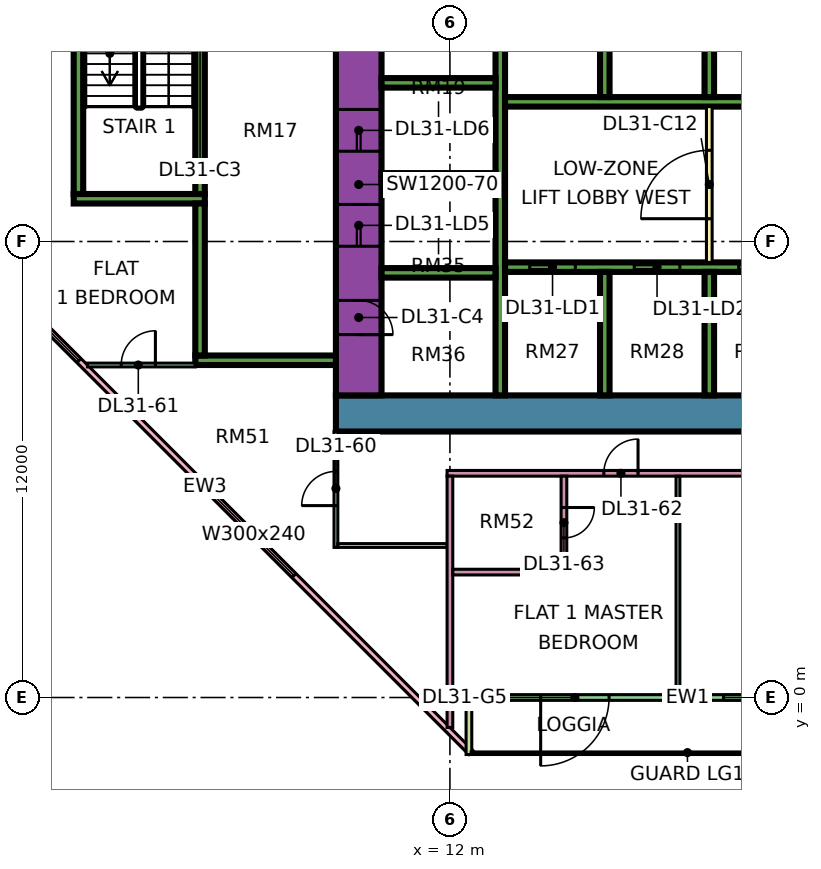
"""IFC4 building model, lengths in metres.
Left out: names, types, materials, properties, quantities, classifications, styles, units other than length and angle.
Written with IfcOpenShell. Run it as: python <this file> out.ifc"""

import sys

from ifc_helpers import new_model, si_unit, direction, frame, frame_2d, origin, place, context, subcontext, project, spatial, rectangle, extrude, element, fill, save


model = new_model("IFC4")
c1 = context("Model", 3, precision=1e-05, world=origin(), true_north=direction((0.0, 1.0)))
c2 = subcontext(c1, "Body", "Model", "MODEL_VIEW")
j1 = project(units=[si_unit("LENGTHUNIT", "METRE"), si_unit("PLANEANGLEUNIT", "RADIAN")], contexts=[c1])
p1 = place(None, origin())
s1 = spatial("IfcSite", under=j1, at=p1, CompositionType="ELEMENT")
p2 = place(p1, origin())
s2 = spatial("IfcBuilding", under=s1, at=p2, CompositionType="ELEMENT")
p3 = place(p2, frame((0.0, 0.0, 133.15)))
s3 = spatial("IfcBuildingStorey", under=s2, at=p3, CompositionType="ELEMENT", Elevation=133.15)
p4 = place(p3, frame((9.0, 7.475, 0.0), z_axis=(0.0, 0.0, 1.0), x_axis=(1.0, 0.0, 0.0)))
e1 = element("IfcWall", 1, at=p4, inside=s3, PredefinedType="SHEAR", context=c2, shape_type="SweptSolid", body=[
    extrude(rectangle(XDim=25.0, YDim=0.95, at=frame_2d((12.5, 0.0))), origin(), (0.0, 0.0, 1.0), 3.75),
])
p5 = place(p3, frame((9.6, 7.95, 0.0), z_axis=(0.0, 0.0, 1.0), x_axis=(0.0, 1.0, 0.0)))
e2 = element("IfcWall", 2, at=p5, inside=s3, PredefinedType="SHEAR", context=c2, shape_type="SweptSolid", body=[
    extrude(rectangle(XDim=11.1, YDim=1.2, at=frame_2d((5.55, 0.0))), origin(), (0.0, 0.0, 1.0), 3.75),
])
p6 = place(p5, frame((3.925, 0.0, 0.0)))
e3 = element("IfcOpeningElement", 3, at=p6, cuts=e2, PredefinedType="OPENING", context=c2, shape_type="SweptSolid", body=[
    extrude(rectangle(XDim=1.1, YDim=2.2, at=frame_2d((0.55, 1.1))), frame((0.0, 0.61, 0.0), z_axis=(0.0, -1.0, 0.0), x_axis=(1.0, 0.0, 0.0)), (0.0, 0.0, 1.0), 1.22),
])
p7 = place(p5, frame((6.425, 0.0, 0.0)))
e4 = element("IfcOpeningElement", 4, at=p7, cuts=e2, PredefinedType="OPENING", context=c2, shape_type="SweptSolid", body=[
    extrude(rectangle(XDim=1.1, YDim=2.2, at=frame_2d((0.55, 1.1))), frame((0.0, 0.61, 0.0), z_axis=(0.0, -1.0, 0.0), x_axis=(1.0, 0.0, 0.0)), (0.0, 0.0, 1.0), 1.22),
])
p8 = place(p5, frame((9.175, 0.0, 0.0)))
e5 = element("IfcOpeningElement", 5, at=p8, cuts=e2, PredefinedType="OPENING", context=c2, shape_type="SweptSolid", body=[
    extrude(rectangle(XDim=1.1, YDim=2.2, at=frame_2d((0.55, 1.1))), frame((0.0, 0.61, 0.0), z_axis=(0.0, -1.0, 0.0), x_axis=(1.0, 0.0, 0.0)), (0.0, 0.0, 1.0), 1.22),
])
p9 = place(p5, frame((1.6, 0.0, 0.0)))
e6 = element("IfcOpeningElement", 6, at=p9, cuts=e2, PredefinedType="OPENING", context=c2, shape_type="SweptSolid", body=[
    extrude(rectangle(XDim=0.9, YDim=2.1, at=frame_2d((0.45, 1.05))), frame((0.0, 0.61, 0.0), z_axis=(0.0, -1.0, 0.0), x_axis=(1.0, 0.0, 0.0)), (0.0, 0.0, 1.0), 1.22),
])
p10 = place(p3, frame((13.325, 7.95, 0.0), z_axis=(0.0, 0.0, 1.0), x_axis=(0.0, 1.0, 0.0)))
e7 = element("IfcWall", 7, at=p10, inside=s3, PredefinedType="SHEAR", context=c2, shape_type="SweptSolid", body=[
    extrude(rectangle(XDim=11.1, YDim=0.25, at=frame_2d((5.55, 0.0))), origin(), (0.0, 0.0, 1.0), 3.75),
])
p11 = place(p3, frame((13.45, 11.325, 0.0), z_axis=(0.0, 0.0, 1.0), x_axis=(1.0, 0.0, 0.0)))
e8 = element("IfcWall", 8, at=p11, inside=s3, PredefinedType="SHEAR", context=c2, shape_type="SweptSolid", body=[
    extrude(rectangle(XDim=19.6, YDim=0.25, at=frame_2d((9.8, 0.0))), origin(), (0.0, 0.0, 1.0), 3.75),
])
p12 = place(p11, frame((0.65, 0.0, 0.0)))
e9 = element("IfcOpeningElement", 9, at=p12, cuts=e8, PredefinedType="OPENING", context=c2, shape_type="SweptSolid", body=[
    extrude(rectangle(XDim=1.2, YDim=2.2, at=frame_2d((0.6, 1.1))), frame((0.0, 0.135, 0.0), z_axis=(0.0, -1.0, 0.0), x_axis=(1.0, 0.0, 0.0)), (0.0, 0.0, 1.0), 0.27),
])
p13 = place(p11, frame((3.4, 0.0, 0.0)))
e10 = element("IfcOpeningElement", 10, at=p13, cuts=e8, PredefinedType="OPENING", context=c2, shape_type="SweptSolid", body=[
    extrude(rectangle(XDim=1.2, YDim=2.2, at=frame_2d((0.6, 1.1))), frame((0.0, 0.135, 0.0), z_axis=(0.0, -1.0, 0.0), x_axis=(1.0, 0.0, 0.0)), (0.0, 0.0, 1.0), 0.27),
])
p14 = place(p11, frame((6.15, 0.0, 0.0)))
e11 = element("IfcOpeningElement", 11, at=p14, cuts=e8, PredefinedType="OPENING", context=c2, shape_type="SweptSolid", body=[
    extrude(rectangle(XDim=1.2, YDim=2.2, at=frame_2d((0.6, 1.1))), frame((0.0, 0.135, 0.0), z_axis=(0.0, -1.0, 0.0), x_axis=(1.0, 0.0, 0.0)), (0.0, 0.0, 1.0), 0.27),
])
p15 = place(p11, frame((8.9, 0.0, 0.0)))
e12 = element("IfcOpeningElement", 12, at=p15, cuts=e8, PredefinedType="OPENING", context=c2, shape_type="SweptSolid", body=[
    extrude(rectangle(XDim=1.2, YDim=2.2, at=frame_2d((0.6, 1.1))), frame((0.0, 0.135, 0.0), z_axis=(0.0, -1.0, 0.0), x_axis=(1.0, 0.0, 0.0)), (0.0, 0.0, 1.0), 0.27),
])
p16 = place(p3, frame((13.45, 15.675, 0.0), z_axis=(0.0, 0.0, 1.0), x_axis=(1.0, 0.0, 0.0)))
e13 = element("IfcWall", 13, at=p16, inside=s3, PredefinedType="SHEAR", context=c2, shape_type="SweptSolid", body=[
    extrude(rectangle(XDim=13.75, YDim=0.25, at=frame_2d((6.875, 0.0))), origin(), (0.0, 0.0, 1.0), 3.75),
])
for number, where, z_axis, x_axis in (
    (14, (10.2, 11.175, 0.0), (0.0, 0.0, 1.0), (1.0, 0.0, 0.0)),
    (15, (10.2, 13.675, 0.0), (0.0, 0.0, 1.0), (1.0, 0.0, 0.0)),
    (16, (10.2, 16.175, 0.0), (0.0, 0.0, 1.0), (1.0, 0.0, 0.0)),
):
    element("IfcWall", number, at=place(p3, frame(where, z_axis=z_axis, x_axis=x_axis)), inside=s3, PredefinedType="SHEAR", context=c2, shape_type="SweptSolid", body=[
        extrude(rectangle(XDim=3.0, YDim=0.25, at=frame_2d((1.5, 0.0))), origin(), (0.0, 0.0, 1.0), 3.75),
    ])
for number, where, z_axis, x_axis in (
    (17, (16.075, 7.95, 0.0), (0.0, 0.0, 1.0), (0.0, 1.0, 0.0)),
    (18, (18.825, 7.95, 0.0), (0.0, 0.0, 1.0), (0.0, 1.0, 0.0)),
    (19, (16.075, 15.8, 0.0), (0.0, 0.0, 1.0), (0.0, 1.0, 0.0)),
    (20, (18.825, 15.8, 0.0), (0.0, 0.0, 1.0), (0.0, 1.0, 0.0)),
):
    element("IfcWall", number, at=place(p3, frame(where, z_axis=z_axis, x_axis=x_axis)), inside=s3, PredefinedType="SHEAR", context=c2, shape_type="SweptSolid", body=[
        extrude(rectangle(XDim=3.25, YDim=0.25, at=frame_2d((1.625, 0.0))), origin(), (0.0, 0.0, 1.0), 3.75),
    ])
p17 = place(p3, frame((2.1, 13.125, 0.0), z_axis=(0.0, 0.0, 1.0), x_axis=(1.0, 0.0, 0.0)))
e21 = element("IfcWall", 21, at=p17, inside=s3, PredefinedType="SHEAR", context=c2, shape_type="SweptSolid", body=[
    extrude(rectangle(XDim=3.45, YDim=0.25, at=frame_2d((1.725, 0.0))), origin(), (0.0, 0.0, 1.0), 3.75),
])
p18 = place(p3, frame((2.225, 13.25, 0.0), z_axis=(0.0, 0.0, 1.0), x_axis=(0.0, 1.0, 0.0)))
e22 = element("IfcWall", 22, at=p18, inside=s3, PredefinedType="SHEAR", context=c2, shape_type="SweptSolid", body=[
    extrude(rectangle(XDim=6.5, YDim=0.25, at=frame_2d((3.25, 0.0))), origin(), (0.0, 0.0, 1.0), 3.75),
])
p19 = place(p3, frame((5.425, 13.25, 0.0), z_axis=(0.0, 0.0, 1.0), x_axis=(0.0, 1.0, 0.0)))
e23 = element("IfcWall", 23, at=p19, inside=s3, PredefinedType="SHEAR", context=c2, shape_type="SweptSolid", body=[
    extrude(rectangle(XDim=6.5, YDim=0.25, at=frame_2d((3.25, 0.0))), origin(), (0.0, 0.0, 1.0), 3.75),
])
p20 = place(p19, frame((5.25, 0.0, 0.0)))
e24 = element("IfcOpeningElement", 24, at=p20, cuts=e23, PredefinedType="OPENING", context=c2, shape_type="SweptSolid", body=[
    extrude(rectangle(XDim=1.1, YDim=2.2, at=frame_2d((0.55, 1.1))), frame((0.0, 0.135, 0.0), z_axis=(0.0, -1.0, 0.0), x_axis=(1.0, 0.0, 0.0)), (0.0, 0.0, 1.0), 0.27),
])
p21 = place(p3, frame((5.3, 8.875, 0.0), z_axis=(0.0, 0.0, 1.0), x_axis=(1.0, 0.0, 0.0)))
e25 = element("IfcWall", 25, at=p21, inside=s3, PredefinedType="SHEAR", context=c2, shape_type="SweptSolid", body=[
    extrude(rectangle(XDim=3.7, YDim=0.25, at=frame_2d((1.85, 0.0))), origin(), (0.0, 0.0, 1.0), 3.75),
])
p22 = place(p3, frame((5.425, 9.0, 0.0), z_axis=(0.0, 0.0, 1.0), x_axis=(0.0, 1.0, 0.0)))
e26 = element("IfcWall", 26, at=p22, inside=s3, PredefinedType="SHEAR", context=c2, shape_type="SweptSolid", body=[
    extrude(rectangle(XDim=4.0, YDim=0.25, at=frame_2d((2.0, 0.0))), origin(), (0.0, 0.0, 1.0), 3.75),
])
p23 = place(p3, frame((-1.447, 12.553, 0.0), z_axis=(0.0, 0.0, 1.0), x_axis=(0.707106781187, -0.707106781187, 0.0)))
e27 = element("IfcWall", 27, at=p23, inside=s3, PredefinedType="SOLIDWALL", context=c2, shape_type="SweptSolid", body=[
    extrude(rectangle(XDim=19.799, YDim=0.15, at=frame_2d((9.899, 0.0))), origin(), (0.0, 0.0, 1.0), 3.35),
])
p24 = place(p23, frame((2.212, 0.0, 0.45)))
e28 = element("IfcOpeningElement", 28, at=p24, cuts=e27, PredefinedType="OPENING", context=c2, shape_type="SweptSolid", body=[
    extrude(rectangle(XDim=3.0, YDim=2.4, at=frame_2d((1.5, 1.2))), frame((0.0, 0.085, 0.0), z_axis=(0.0, -1.0, 0.0), x_axis=(1.0, 0.0, 0.0)), (0.0, 0.0, 1.0), 0.17),
])
p25 = place(p23, frame((10.216, 0.0, 0.45)))
e29 = element("IfcOpeningElement", 29, at=p25, cuts=e27, PredefinedType="OPENING", context=c2, shape_type="SweptSolid", body=[
    extrude(rectangle(XDim=3.0, YDim=2.4, at=frame_2d((1.5, 1.2))), frame((0.0, 0.085, 0.0), z_axis=(0.0, -1.0, 0.0), x_axis=(1.0, 0.0, 0.0)), (0.0, 0.0, 1.0), 0.17),
])
p26 = place(p3, frame((12.575, 0.0, 0.0), z_axis=(0.0, 0.0, 1.0), x_axis=(1.0, 0.0, 0.0)))
e30 = element("IfcWall", 30, at=p26, inside=s3, PredefinedType="SOLIDWALL", context=c2, shape_type="SweptSolid", body=[
    extrude(rectangle(XDim=11.35, YDim=0.15, at=frame_2d((5.675, 0.0))), origin(), (0.0, 0.0, 1.0), 3.35),
])
p27 = place(p26, frame((1.812, 0.0, 0.0)))
e31 = element("IfcOpeningElement", 31, at=p27, cuts=e30, PredefinedType="OPENING", context=c2, shape_type="SweptSolid", body=[
    extrude(rectangle(XDim=1.8, YDim=2.4, at=frame_2d((0.9, 1.2))), frame((0.0, 0.085, 0.0), z_axis=(0.0, -1.0, 0.0), x_axis=(1.0, 0.0, 0.0)), (0.0, 0.0, 1.0), 0.17),
])
p28 = place(p26, frame((6.625, 0.0, 0.45)))
e32 = element("IfcOpeningElement", 32, at=p28, cuts=e30, PredefinedType="OPENING", context=c2, shape_type="SweptSolid", body=[
    extrude(rectangle(XDim=3.0, YDim=2.4, at=frame_2d((1.5, 1.2))), frame((0.0, 0.085, 0.0), z_axis=(0.0, -1.0, 0.0), x_axis=(1.0, 0.0, 0.0)), (0.0, 0.0, 1.0), 0.17),
])
p29 = place(p3, frame((12.5, -1.5, 0.0), z_axis=(0.0, 0.0, 1.0), x_axis=(0.0, 1.0, 0.0)))
e33 = element("IfcWall", 33, at=p29, inside=s3, PredefinedType="SOLIDWALL", context=c2, shape_type="SweptSolid", body=[
    extrude(rectangle(XDim=1.5, YDim=0.15, at=frame_2d((0.75, 0.0))), origin(), (0.0, 0.0, 1.0), 3.35),
])
p30 = place(p3, frame((18.825, 11.45, 0.0), z_axis=(0.0, 0.0, 1.0), x_axis=(0.0, 1.0, 0.0)))
e34 = element("IfcWall", 34, at=p30, inside=s3, PredefinedType="PARTITIONING", context=c2, shape_type="SweptSolid", body=[
    extrude(rectangle(XDim=4.1, YDim=0.15, at=frame_2d((2.05, 0.0))), origin(), (0.0, 0.0, 1.0), 3.35),
])
p31 = place(p30, frame((1.15, 0.0, 0.0)))
e35 = element("IfcOpeningElement", 35, at=p31, cuts=e34, PredefinedType="OPENING", context=c2, shape_type="SweptSolid", body=[
    extrude(rectangle(XDim=1.8, YDim=2.4, at=frame_2d((0.9, 1.2))), frame((0.0, 0.085, 0.0), z_axis=(0.0, -1.0, 0.0), x_axis=(1.0, 0.0, 0.0)), (0.0, 0.0, 1.0), 0.17),
])
p32 = place(p3, frame((2.461, 8.75, 0.0), z_axis=(0.0, 0.0, 1.0), x_axis=(1.0, 0.0, 0.0)))
e36 = element("IfcWall", 36, at=p32, inside=s3, PredefinedType="PARTITIONING", context=c2, shape_type="SweptSolid", body=[
    extrude(rectangle(XDim=2.839, YDim=0.1, at=frame_2d((1.419, 0.0))), origin(), (0.0, 0.0, 1.0), 3.35),
])
p33 = place(p32, frame((0.889, 0.0, 0.0)))
e37 = element("IfcOpeningElement", 37, at=p33, cuts=e36, PredefinedType="OPENING", context=c2, shape_type="SweptSolid", body=[
    extrude(rectangle(XDim=0.9, YDim=2.1, at=frame_2d((0.45, 1.05))), frame((0.0, 0.06, 0.0), z_axis=(0.0, -1.0, 0.0), x_axis=(1.0, 0.0, 0.0)), (0.0, 0.0, 1.0), 0.12),
])
p34 = place(p3, frame((9.0, 3.95, 0.0), z_axis=(0.0, 0.0, 1.0), x_axis=(0.0, 1.0, 0.0)))
e38 = element("IfcWall", 38, at=p34, inside=s3, PredefinedType="PARTITIONING", context=c2, shape_type="SweptSolid", body=[
    extrude(rectangle(XDim=3.05, YDim=0.1, at=frame_2d((1.525, 0.0))), origin(), (0.0, 0.0, 1.0), 3.35),
])
p35 = place(p34, frame((1.1, 0.0, 0.0)))
e39 = element("IfcOpeningElement", 39, at=p35, cuts=e38, PredefinedType="OPENING", context=c2, shape_type="SweptSolid", body=[
    extrude(rectangle(XDim=0.9, YDim=2.1, at=frame_2d((0.45, 1.05))), frame((0.0, 0.06, 0.0), z_axis=(0.0, -1.0, 0.0), x_axis=(1.0, 0.0, 0.0)), (0.0, 0.0, 1.0), 0.12),
])
p36 = place(p3, frame((9.05, 4.0, 0.0), z_axis=(0.0, 0.0, 1.0), x_axis=(1.0, 0.0, 0.0)))
e40 = element("IfcWall", 40, at=p36, inside=s3, PredefinedType="PARTITIONING", context=c2, shape_type="SweptSolid", body=[
    extrude(rectangle(XDim=2.875, YDim=0.1, at=frame_2d((1.438, 0.0))), origin(), (0.0, 0.0, 1.0), 3.35),
])
p37 = place(p3, frame((11.925, 5.9, 0.0), z_axis=(0.0, 0.0, 1.0), x_axis=(1.0, 0.0, 0.0)))
e41 = element("IfcWall", 41, at=p37, inside=s3, PredefinedType="PARTITIONING", context=c2, shape_type="SweptSolid", body=[
    extrude(rectangle(XDim=21.125, YDim=0.15, at=frame_2d((10.562, 0.0))), origin(), (0.0, 0.0, 1.0), 3.35),
])
p38 = place(p37, frame((16.125, 0.0, 0.0)))
e42 = element("IfcOpeningElement", 42, at=p38, cuts=e41, PredefinedType="OPENING", context=c2, shape_type="SweptSolid", body=[
    extrude(rectangle(XDim=0.9, YDim=2.1, at=frame_2d((0.45, 1.05))), frame((0.0, 0.085, 0.0), z_axis=(0.0, -1.0, 0.0), x_axis=(1.0, 0.0, 0.0)), (0.0, 0.0, 1.0), 0.17),
])
p39 = place(p37, frame((4.125, 0.0, 0.0)))
e43 = element("IfcOpeningElement", 43, at=p39, cuts=e41, PredefinedType="OPENING", context=c2, shape_type="SweptSolid", body=[
    extrude(rectangle(XDim=0.9, YDim=2.1, at=frame_2d((0.45, 1.05))), frame((0.0, 0.085, 0.0), z_axis=(0.0, -1.0, 0.0), x_axis=(1.0, 0.0, 0.0)), (0.0, 0.0, 1.0), 0.17),
])
p40 = place(p37, frame((10.125, 0.0, 0.0)))
e44 = element("IfcOpeningElement", 44, at=p40, cuts=e41, PredefinedType="OPENING", context=c2, shape_type="SweptSolid", body=[
    extrude(rectangle(XDim=0.9, YDim=2.1, at=frame_2d((0.45, 1.05))), frame((0.0, 0.085, 0.0), z_axis=(0.0, -1.0, 0.0), x_axis=(1.0, 0.0, 0.0)), (0.0, 0.0, 1.0), 0.17),
])
p41 = place(p3, frame((12.0, -0.788, 0.0), z_axis=(0.0, 0.0, 1.0), x_axis=(0.0, 1.0, 0.0)))
e45 = element("IfcWall", 45, at=p41, inside=s3, PredefinedType="PARTITIONING", context=c2, shape_type="SweptSolid", body=[
    extrude(rectangle(XDim=6.613, YDim=0.15, at=frame_2d((3.306, 0.0))), origin(), (0.0, 0.0, 1.0), 3.35),
])
p42 = place(p3, frame((12.075, 3.3, 0.0), z_axis=(0.0, 0.0, 1.0), x_axis=(1.0, 0.0, 0.0)))
e46 = element("IfcWall", 46, at=p42, inside=s3, PredefinedType="PARTITIONING", context=c2, shape_type="SweptSolid", body=[
    extrude(rectangle(XDim=3.0, YDim=0.15, at=frame_2d((1.5, 0.0))), origin(), (0.0, 0.0, 1.0), 3.35),
])
p43 = place(p3, frame((15.0, 3.375, 0.0), z_axis=(0.0, 0.0, 1.0), x_axis=(0.0, 1.0, 0.0)))
e47 = element("IfcWall", 47, at=p43, inside=s3, PredefinedType="PARTITIONING", context=c2, shape_type="SweptSolid", body=[
    extrude(rectangle(XDim=2.45, YDim=0.15, at=frame_2d((1.225, 0.0))), origin(), (0.0, 0.0, 1.0), 3.35),
])
p44 = place(p43, frame((0.825, 0.0, 0.0)))
e48 = element("IfcOpeningElement", 48, at=p44, cuts=e47, PredefinedType="OPENING", context=c2, shape_type="SweptSolid", body=[
    extrude(rectangle(XDim=0.8, YDim=2.1, at=frame_2d((0.4, 1.05))), frame((0.0, 0.085, 0.0), z_axis=(0.0, -1.0, 0.0), x_axis=(1.0, 0.0, 0.0)), (0.0, 0.0, 1.0), 0.17),
])
p45 = place(p3, frame((18.0, 0.074, 0.0), z_axis=(0.0, 0.0, 1.0), x_axis=(0.0, 1.0, 0.0)))
e49 = element("IfcWall", 49, at=p45, inside=s3, PredefinedType="PARTITIONING", context=c2, shape_type="SweptSolid", body=[
    extrude(rectangle(XDim=5.751, YDim=0.1, at=frame_2d((2.875, 0.0))), origin(), (0.0, 0.0, 1.0), 3.35),
])
p46 = place(p24, origin())
e50 = element("IfcWindow", 50, at=p46, inside=s3, PartitioningType="SINGLE_PANEL", PredefinedType="WINDOW", context=c2, shape_type="SweptSolid", body=[
    extrude(rectangle(XDim=3.0, YDim=2.4, at=frame_2d((1.5, 1.2))), frame((0.0, 0.03, 0.0), z_axis=(0.0, -1.0, 0.0), x_axis=(1.0, 0.0, 0.0)), (0.0, 0.0, 1.0), 0.06),
])
fill(e28, e50)
p47 = place(p25, origin())
e51 = element("IfcWindow", 51, at=p47, inside=s3, PartitioningType="SINGLE_PANEL", PredefinedType="WINDOW", context=c2, shape_type="SweptSolid", body=[
    extrude(rectangle(XDim=3.0, YDim=2.4, at=frame_2d((1.5, 1.2))), frame((0.0, 0.03, 0.0), z_axis=(0.0, -1.0, 0.0), x_axis=(1.0, 0.0, 0.0)), (0.0, 0.0, 1.0), 0.06),
])
fill(e29, e51)
p48 = place(p27, frame((1.8, 0.0, 0.0), z_axis=(0.0, 0.0, 1.0), x_axis=(-1.0, 0.0, 0.0)))
e52 = element("IfcDoor", 52, at=p48, inside=s3, OperationType="DOUBLE_DOOR_SINGLE_SWING", PredefinedType="DOOR", context=c2, shape_type="SweptSolid", body=[
    extrude(rectangle(XDim=1.8, YDim=2.4, at=frame_2d((0.9, 1.2))), frame((0.0, 0.025, 0.0), z_axis=(0.0, -1.0, 0.0), x_axis=(1.0, 0.0, 0.0)), (0.0, 0.0, 1.0), 0.05),
])
fill(e31, e52)
p49 = place(p28, origin())
e53 = element("IfcWindow", 53, at=p49, inside=s3, PartitioningType="SINGLE_PANEL", PredefinedType="WINDOW", context=c2, shape_type="SweptSolid", body=[
    extrude(rectangle(XDim=3.0, YDim=2.4, at=frame_2d((1.5, 1.2))), frame((0.0, 0.03, 0.0), z_axis=(0.0, -1.0, 0.0), x_axis=(1.0, 0.0, 0.0)), (0.0, 0.0, 1.0), 0.06),
])
fill(e32, e53)
p50 = place(p12, origin())
e54 = element("IfcDoor", 54, at=p50, inside=s3, OperationType="DOUBLE_DOOR_SLIDING", PredefinedType="DOOR", context=c2, shape_type="SweptSolid", body=[
    extrude(rectangle(XDim=1.2, YDim=2.2, at=frame_2d((0.6, 1.1))), frame((0.0, 0.025, 0.0), z_axis=(0.0, -1.0, 0.0), x_axis=(1.0, 0.0, 0.0)), (0.0, 0.0, 1.0), 0.05),
])
fill(e9, e54)
p51 = place(p13, origin())
e55 = element("IfcDoor", 55, at=p51, inside=s3, OperationType="DOUBLE_DOOR_SLIDING", PredefinedType="DOOR", context=c2, shape_type="SweptSolid", body=[
    extrude(rectangle(XDim=1.2, YDim=2.2, at=frame_2d((0.6, 1.1))), frame((0.0, 0.025, 0.0), z_axis=(0.0, -1.0, 0.0), x_axis=(1.0, 0.0, 0.0)), (0.0, 0.0, 1.0), 0.05),
])
fill(e10, e55)
p52 = place(p14, origin())
e56 = element("IfcDoor", 56, at=p52, inside=s3, OperationType="DOUBLE_DOOR_SLIDING", PredefinedType="DOOR", context=c2, shape_type="SweptSolid", body=[
    extrude(rectangle(XDim=1.2, YDim=2.2, at=frame_2d((0.6, 1.1))), frame((0.0, 0.025, 0.0), z_axis=(0.0, -1.0, 0.0), x_axis=(1.0, 0.0, 0.0)), (0.0, 0.0, 1.0), 0.05),
])
fill(e11, e56)
p53 = place(p6, origin())
e57 = element("IfcDoor", 57, at=p53, inside=s3, OperationType="DOUBLE_DOOR_SLIDING", PredefinedType="DOOR", context=c2, shape_type="SweptSolid", body=[
    extrude(rectangle(XDim=1.1, YDim=2.2, at=frame_2d((0.55, 1.1))), frame((0.0, 0.025, 0.0), z_axis=(0.0, -1.0, 0.0), x_axis=(1.0, 0.0, 0.0)), (0.0, 0.0, 1.0), 0.05),
])
fill(e3, e57)
p54 = place(p7, origin())
e58 = element("IfcDoor", 58, at=p54, inside=s3, OperationType="DOUBLE_DOOR_SLIDING", PredefinedType="DOOR", context=c2, shape_type="SweptSolid", body=[
    extrude(rectangle(XDim=1.1, YDim=2.2, at=frame_2d((0.55, 1.1))), frame((0.0, 0.025, 0.0), z_axis=(0.0, -1.0, 0.0), x_axis=(1.0, 0.0, 0.0)), (0.0, 0.0, 1.0), 0.05),
])
fill(e4, e58)
p55 = place(p9, frame((0.9, 0.0, 0.0), z_axis=(0.0, 0.0, 1.0), x_axis=(-1.0, 0.0, 0.0)))
e59 = element("IfcDoor", 59, at=p55, inside=s3, OperationType="SINGLE_SWING_LEFT", PredefinedType="DOOR", context=c2, shape_type="SweptSolid", body=[
    extrude(rectangle(XDim=0.9, YDim=2.1, at=frame_2d((0.45, 1.05))), frame((0.0, 0.025, 0.0), z_axis=(0.0, -1.0, 0.0), x_axis=(1.0, 0.0, 0.0)), (0.0, 0.0, 1.0), 0.05),
])
fill(e6, e59)
p56 = place(p31, origin())
e60 = element("IfcDoor", 60, at=p56, inside=s3, OperationType="DOUBLE_DOOR_SINGLE_SWING", PredefinedType="DOOR", context=c2, shape_type="SweptSolid", body=[
    extrude(rectangle(XDim=1.8, YDim=2.4, at=frame_2d((0.9, 1.2))), frame((0.0, 0.025, 0.0), z_axis=(0.0, -1.0, 0.0), x_axis=(1.0, 0.0, 0.0)), (0.0, 0.0, 1.0), 0.05),
])
fill(e35, e60)
p57 = place(p35, origin())
e61 = element("IfcDoor", 61, at=p57, inside=s3, OperationType="SINGLE_SWING_LEFT", PredefinedType="DOOR", context=c2, shape_type="SweptSolid", body=[
    extrude(rectangle(XDim=0.9, YDim=2.1, at=frame_2d((0.45, 1.05))), frame((0.0, 0.025, 0.0), z_axis=(0.0, -1.0, 0.0), x_axis=(1.0, 0.0, 0.0)), (0.0, 0.0, 1.0), 0.05),
])
fill(e39, e61)
p58 = place(p33, frame((0.9, 0.0, 0.0), z_axis=(0.0, 0.0, 1.0), x_axis=(-1.0, 0.0, 0.0)))
e62 = element("IfcDoor", 62, at=p58, inside=s3, OperationType="SINGLE_SWING_RIGHT", PredefinedType="DOOR", context=c2, shape_type="SweptSolid", body=[
    extrude(rectangle(XDim=0.9, YDim=2.1, at=frame_2d((0.45, 1.05))), frame((0.0, 0.025, 0.0), z_axis=(0.0, -1.0, 0.0), x_axis=(1.0, 0.0, 0.0)), (0.0, 0.0, 1.0), 0.05),
])
fill(e37, e62)
p59 = place(p39, frame((0.9, 0.0, 0.0), z_axis=(0.0, 0.0, 1.0), x_axis=(-1.0, 0.0, 0.0)))
e63 = element("IfcDoor", 63, at=p59, inside=s3, OperationType="SINGLE_SWING_RIGHT", PredefinedType="DOOR", context=c2, shape_type="SweptSolid", body=[
    extrude(rectangle(XDim=0.9, YDim=2.1, at=frame_2d((0.45, 1.05))), frame((0.0, 0.025, 0.0), z_axis=(0.0, -1.0, 0.0), x_axis=(1.0, 0.0, 0.0)), (0.0, 0.0, 1.0), 0.05),
])
fill(e43, e63)
p60 = place(p44, origin())
e64 = element("IfcDoor", 64, at=p60, inside=s3, OperationType="SINGLE_SWING_RIGHT", PredefinedType="DOOR", context=c2, shape_type="SweptSolid", body=[
    extrude(rectangle(XDim=0.8, YDim=2.1, at=frame_2d((0.4, 1.05))), frame((0.0, 0.025, 0.0), z_axis=(0.0, -1.0, 0.0), x_axis=(1.0, 0.0, 0.0)), (0.0, 0.0, 1.0), 0.05),
])
fill(e48, e64)
save(model, sys.argv[1])
